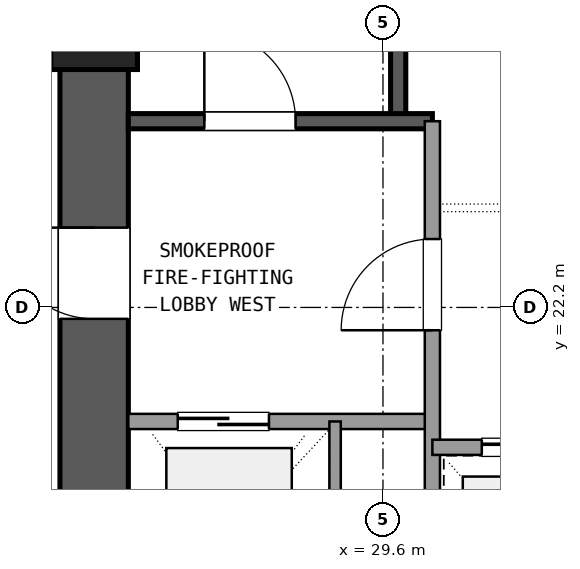
"""IFC4 building model, lengths in metres.
Left out: names, types, materials, properties, quantities, classifications, styles, units other than length and angle.
Written with IfcOpenShell. Run it as: python <this file> out.ifc"""

import sys

from ifc_helpers import new_model, si_unit, direction, frame, frame_2d, origin, origin_2d, place, context, subcontext, project, spatial, rectangle, extrude, element, fill, save


model = new_model("IFC4")
c1 = context("Model", 3, precision=1e-05, world=origin(), true_north=direction((0.0, 1.0)))
c2 = subcontext(c1, "Body", "Model", "MODEL_VIEW")
j1 = project(units=[si_unit("LENGTHUNIT", "METRE"), si_unit("PLANEANGLEUNIT", "RADIAN")], contexts=[c1])
p1 = place(None, origin())
s1 = spatial("IfcSite", under=j1, at=p1, CompositionType="ELEMENT")
p2 = place(p1, origin())
s2 = spatial("IfcBuilding", under=s1, at=p2, CompositionType="ELEMENT")
p3 = place(p2, frame((0.0, 0.0, 18.9)))
s3 = spatial("IfcBuildingStorey", under=s2, at=p3, CompositionType="ELEMENT", Elevation=18.9)
p4 = place(p3, frame((25.8, 25.9, 0.0), z_axis=(0.0, 0.0, 1.0), x_axis=(1.0, 0.0, 0.0)))
e1 = element("IfcColumn", 1, at=p4, inside=s3, PredefinedType="COLUMN", context=c2, shape_type="SweptSolid", body=[
    extrude(rectangle(XDim=1.14, YDim=1.14, at=origin_2d()), origin(), (0.0, 0.0, 1.0), 5.04),
])
p5 = place(p3, frame((25.8, 25.335, 0.0), z_axis=(0.0, 0.0, 1.0), x_axis=(0.0, -1.0, 0.0)))
e2 = element("IfcWall", 2, at=p5, inside=s3, PredefinedType="SHEAR", context=c2, shape_type="SweptSolid", body=[
    extrude(rectangle(XDim=7.47, YDim=0.9, at=frame_2d((3.735, 0.0))), origin(), (0.0, 0.0, 1.0), 4.76),
])
p6 = place(p5, frame((2.085, 0.0, 0.0)))
e3 = element("IfcOpeningElement", 3, at=p6, cuts=e2, PredefinedType="OPENING", context=c2, shape_type="SweptSolid", body=[
    extrude(rectangle(XDim=1.2, YDim=2.15, at=frame_2d((0.6, 1.075))), frame((0.0, 0.46, 0.0), z_axis=(0.0, -1.0, 0.0), x_axis=(1.0, 0.0, 0.0)), (0.0, 0.0, 1.0), 0.92),
])
p7 = place(p3, frame((29.8, 24.65, 0.0), z_axis=(0.0, 0.0, 1.0), x_axis=(0.0, 1.0, 0.0)))
e4 = element("IfcWall", 4, at=p7, inside=s3, PredefinedType="SHEAR", context=c2, shape_type="SweptSolid", body=[
    extrude(rectangle(XDim=9.4, YDim=0.2, at=frame_2d((4.7, 0.0))), origin(), (0.0, 0.0, 1.0), 4.76),
])
p8 = place(p3, frame((26.25, 24.65, 0.0), z_axis=(0.0, 0.0, 1.0), x_axis=(1.0, 0.0, 0.0)))
e5 = element("IfcWall", 5, at=p8, inside=s3, PredefinedType="SHEAR", context=c2, shape_type="SweptSolid", body=[
    extrude(rectangle(XDim=4.0, YDim=0.2, at=frame_2d((2.0, 0.0))), origin(), (0.0, 0.0, 1.0), 4.76),
])
p9 = place(p8, frame((1.0, 0.0, 0.0)))
e6 = element("IfcOpeningElement", 6, at=p9, cuts=e5, PredefinedType="OPENING", context=c2, shape_type="SweptSolid", body=[
    extrude(rectangle(XDim=1.2, YDim=2.15, at=frame_2d((0.6, 1.075))), frame((0.0, 0.11, 0.0), z_axis=(0.0, -1.0, 0.0), x_axis=(1.0, 0.0, 0.0)), (0.0, 0.0, 1.0), 0.22),
])
p10 = place(p3, frame((26.25, 20.7, 0.0), z_axis=(0.0, 0.0, 1.0), x_axis=(1.0, 0.0, 0.0)))
e7 = element("IfcWall", 7, at=p10, inside=s3, PredefinedType="SOLIDWALL", context=c2, shape_type="SweptSolid", body=[
    extrude(rectangle(XDim=4.0, YDim=0.2, at=frame_2d((2.0, 0.0))), origin(), (0.0, 0.0, 1.0), 3.13),
])
p11 = place(p10, frame((0.65, 0.0, 0.0)))
e8 = element("IfcOpeningElement", 8, at=p11, cuts=e7, PredefinedType="OPENING", context=c2, shape_type="SweptSolid", body=[
    extrude(rectangle(XDim=1.2, YDim=2.15, at=frame_2d((0.6, 1.075))), frame((0.0, 0.11, 0.0), z_axis=(0.0, -1.0, 0.0), x_axis=(1.0, 0.0, 0.0)), (0.0, 0.0, 1.0), 0.22),
])
p12 = place(p3, frame((30.25, 17.75, 0.0), z_axis=(0.0, 0.0, 1.0), x_axis=(0.0, 1.0, 0.0)))
e9 = element("IfcWall", 9, at=p12, inside=s3, PredefinedType="SOLIDWALL", context=c2, shape_type="SweptSolid", body=[
    extrude(rectangle(XDim=6.9, YDim=0.2, at=frame_2d((3.45, 0.0))), origin(), (0.0, 0.0, 1.0), 3.13),
])
p13 = place(p12, frame((4.15, 0.0, 0.0)))
e10 = element("IfcOpeningElement", 10, at=p13, cuts=e9, PredefinedType="OPENING", context=c2, shape_type="SweptSolid", body=[
    extrude(rectangle(XDim=1.2, YDim=2.15, at=frame_2d((0.6, 1.075))), frame((0.0, 0.11, 0.0), z_axis=(0.0, -1.0, 0.0), x_axis=(1.0, 0.0, 0.0)), (0.0, 0.0, 1.0), 0.22),
])
p14 = place(p3, frame((28.97, 17.75, 0.0), z_axis=(0.0, 0.0, 1.0), x_axis=(0.0, 1.0, 0.0)))
e11 = element("IfcWall", 11, at=p14, inside=s3, PredefinedType="PARTITIONING", context=c2, shape_type="SweptSolid", body=[
    extrude(rectangle(XDim=2.95, YDim=0.15, at=frame_2d((1.475, 0.0))), origin(), (0.0, 0.0, 1.0), 3.13),
])
p15 = place(p3, frame((30.25, 20.36, 0.0), z_axis=(0.0, 0.0, 1.0), x_axis=(1.0, 0.0, 0.0)))
e12 = element("IfcWall", 12, at=p15, inside=s3, PredefinedType="SOLIDWALL", context=c2, shape_type="SweptSolid", body=[
    extrude(rectangle(XDim=7.0, YDim=0.2, at=frame_2d((3.5, 0.0))), origin(), (0.0, 0.0, 1.0), 3.13),
])
p16 = place(p15, frame((0.65, 0.0, 0.0)))
e13 = element("IfcOpeningElement", 13, at=p16, cuts=e12, PredefinedType="OPENING", context=c2, shape_type="SweptSolid", body=[
    extrude(rectangle(XDim=1.1, YDim=2.15, at=frame_2d((0.55, 1.075))), frame((0.0, 0.11, 0.0), z_axis=(0.0, -1.0, 0.0), x_axis=(1.0, 0.0, 0.0)), (0.0, 0.0, 1.0), 0.22),
])
p17 = place(p15, frame((2.95, 0.0, 0.0)))
e14 = element("IfcOpeningElement", 14, at=p17, cuts=e12, PredefinedType="OPENING", context=c2, shape_type="SweptSolid", body=[
    extrude(rectangle(XDim=1.1, YDim=2.15, at=frame_2d((0.55, 1.075))), frame((0.0, 0.11, 0.0), z_axis=(0.0, -1.0, 0.0), x_axis=(1.0, 0.0, 0.0)), (0.0, 0.0, 1.0), 0.22),
])
p18 = place(p15, frame((5.25, 0.0, 0.0)))
e15 = element("IfcOpeningElement", 15, at=p18, cuts=e12, PredefinedType="OPENING", context=c2, shape_type="SweptSolid", body=[
    extrude(rectangle(XDim=1.1, YDim=2.15, at=frame_2d((0.55, 1.075))), frame((0.0, 0.11, 0.0), z_axis=(0.0, -1.0, 0.0), x_axis=(1.0, 0.0, 0.0)), (0.0, 0.0, 1.0), 0.22),
])
p19 = place(p9, origin())
e16 = element("IfcDoor", 16, at=p19, inside=s3, OperationType="SINGLE_SWING_LEFT", PredefinedType="DOOR", context=c2, shape_type="SweptSolid", body=[
    extrude(rectangle(XDim=1.2, YDim=2.15, at=frame_2d((0.6, 1.075))), frame((0.0, 0.025, 0.0), z_axis=(0.0, -1.0, 0.0), x_axis=(1.0, 0.0, 0.0)), (0.0, 0.0, 1.0), 0.05),
])
fill(e6, e16)
p20 = place(p11, origin())
e17 = element("IfcDoor", 17, at=p20, inside=s3, OperationType="SLIDING_TO_LEFT", PredefinedType="DOOR", context=c2, shape_type="SweptSolid", body=[
    extrude(rectangle(XDim=1.2, YDim=2.15, at=frame_2d((0.6, 1.075))), frame((0.0, 0.025, 0.0), z_axis=(0.0, -1.0, 0.0), x_axis=(1.0, 0.0, 0.0)), (0.0, 0.0, 1.0), 0.05),
])
fill(e8, e17)
p21 = place(p13, origin())
e18 = element("IfcDoor", 18, at=p21, inside=s3, OperationType="SINGLE_SWING_LEFT", PredefinedType="DOOR", context=c2, shape_type="SweptSolid", body=[
    extrude(rectangle(XDim=1.2, YDim=2.15, at=frame_2d((0.6, 1.075))), frame((0.0, 0.025, 0.0), z_axis=(0.0, -1.0, 0.0), x_axis=(1.0, 0.0, 0.0)), (0.0, 0.0, 1.0), 0.05),
])
fill(e10, e18)
p22 = place(p6, frame((1.2, 0.0, 0.0), z_axis=(0.0, 0.0, 1.0), x_axis=(-1.0, 0.0, 0.0)))
e19 = element("IfcDoor", 19, at=p22, inside=s3, OperationType="SINGLE_SWING_LEFT", PredefinedType="DOOR", context=c2, shape_type="SweptSolid", body=[
    extrude(rectangle(XDim=1.2, YDim=2.15, at=frame_2d((0.6, 1.075))), frame((0.0, 0.025, 0.0), z_axis=(0.0, -1.0, 0.0), x_axis=(1.0, 0.0, 0.0)), (0.0, 0.0, 1.0), 0.05),
])
fill(e3, e19)
p23 = place(p16, origin())
e20 = element("IfcDoor", 20, at=p23, inside=s3, OperationType="SLIDING_TO_LEFT", PredefinedType="DOOR", context=c2, shape_type="SweptSolid", body=[
    extrude(rectangle(XDim=1.1, YDim=2.15, at=frame_2d((0.55, 1.075))), frame((0.0, 0.025, 0.0), z_axis=(0.0, -1.0, 0.0), x_axis=(1.0, 0.0, 0.0)), (0.0, 0.0, 1.0), 0.05),
])
fill(e13, e20)
save(model, sys.argv[1])
